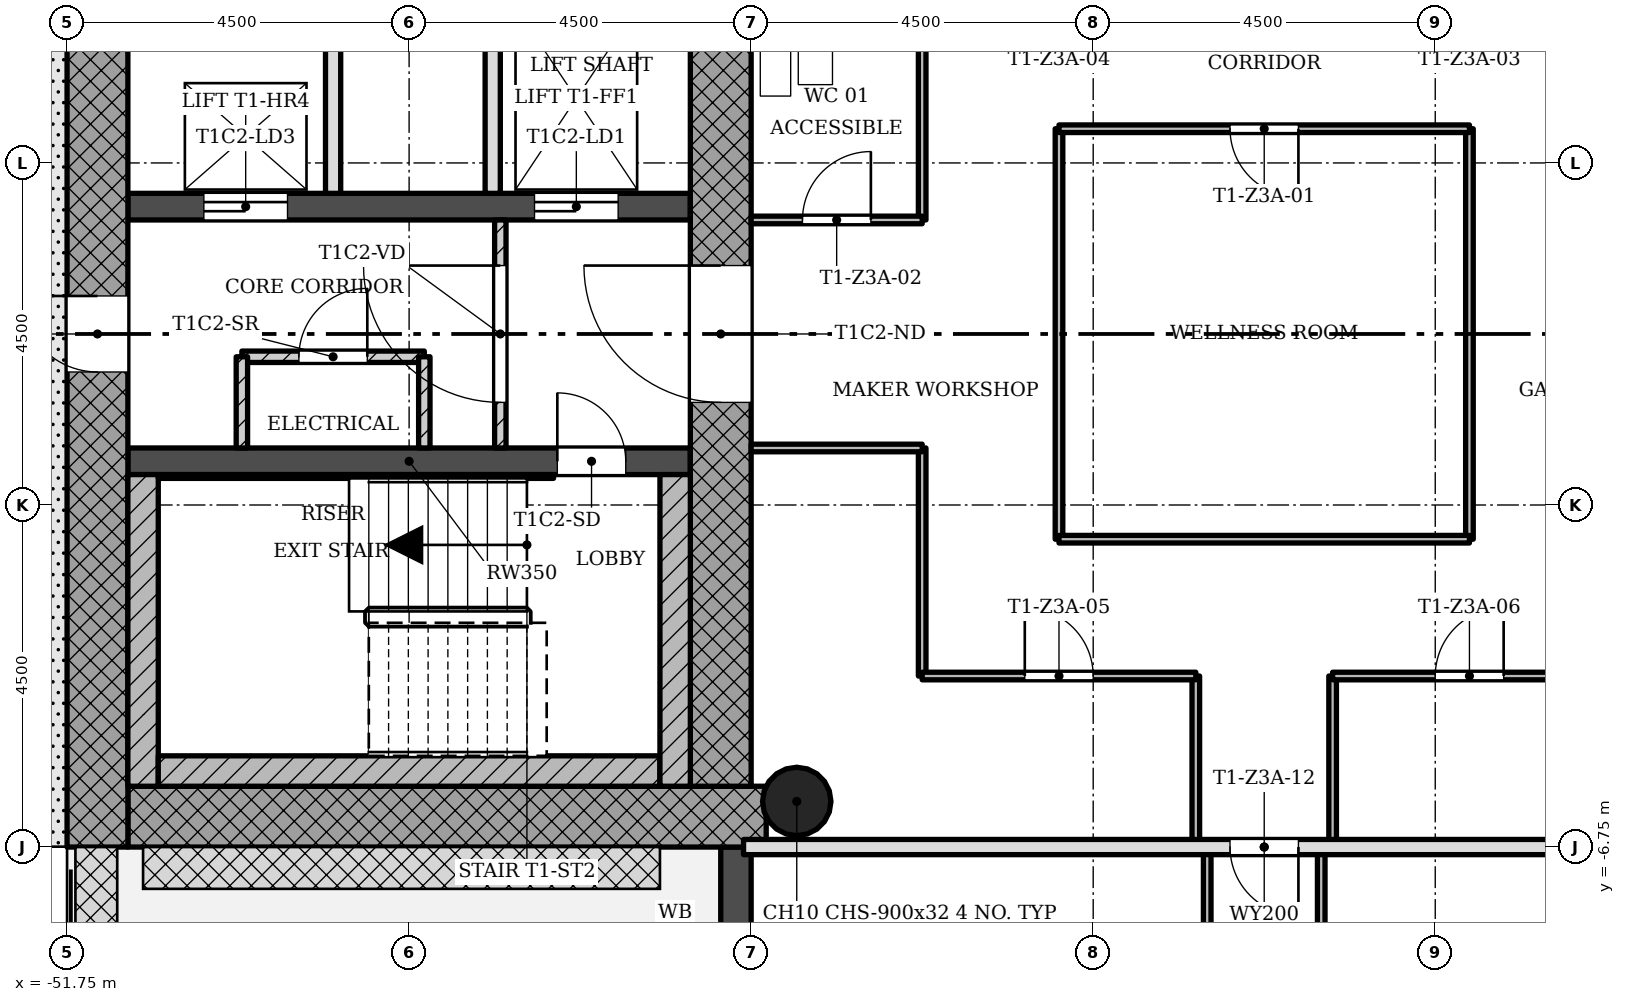
"""IFC4 building model, lengths in metres.
Left out: names, types, materials, properties, quantities, classifications, styles, units other than length and angle.
Written with IfcOpenShell. Run it as: python <this file> out.ifc"""

import sys

from ifc_helpers import new_model, si_unit, direction, frame, frame_2d, origin, origin_2d, place, context, subcontext, project, spatial, rectangle, hollow_circle, extrude, element, fill, save


model = new_model("IFC4")
c1 = context("Model", 3, precision=1e-05, world=origin(), true_north=direction((0.0, 1.0)))
c2 = subcontext(c1, "Body", "Model", "MODEL_VIEW")
j1 = project(units=[si_unit("LENGTHUNIT", "METRE"), si_unit("PLANEANGLEUNIT", "RADIAN")], contexts=[c1])
p1 = place(None, origin())
s1 = spatial("IfcSite", under=j1, at=p1, CompositionType="ELEMENT")
p2 = place(p1, origin())
s2 = spatial("IfcBuilding", under=s1, at=p2, CompositionType="ELEMENT")
p3 = place(p2, frame((0.0, 0.0, 133.7)))
s3 = spatial("IfcBuildingStorey", under=s2, at=p3, CompositionType="ELEMENT", Elevation=133.7)
p4 = place(p3, frame((-50.95, -6.35, 0.0), z_axis=(0.0, 0.0, 1.0), x_axis=(1.0, 0.0, 0.0)))
e1 = element("IfcWall", 1, at=p4, inside=s3, PredefinedType="SHEAR", context=c2, shape_type="SweptSolid", body=[
    extrude(rectangle(XDim=8.398, YDim=0.8, at=frame_2d((4.199, 0.0))), origin(), (0.0, 0.0, 1.0), 3.4),
])
p5 = place(p3, frame((-43.15, -5.95, 0.0), z_axis=(0.0, 0.0, 1.0), x_axis=(0.0, 1.0, 0.0)))
e2 = element("IfcWall", 2, at=p5, inside=s3, PredefinedType="SHEAR", context=c2, shape_type="SweptSolid", body=[
    extrude(rectangle(XDim=12.7, YDim=0.8, at=frame_2d((6.35, 0.0))), origin(), (0.0, 0.0, 1.0), 3.4),
])
p6 = place(p5, frame((5.05, 0.0, 0.0)))
e3 = element("IfcOpeningElement", 3, at=p6, cuts=e2, PredefinedType="OPENING", context=c2, shape_type="SweptSolid", body=[
    extrude(rectangle(XDim=1.8, YDim=2.1, at=frame_2d((0.9, 1.05))), frame((0.0, 0.41, 0.0), z_axis=(0.0, -1.0, 0.0), x_axis=(1.0, 0.0, 0.0)), (0.0, 0.0, 1.0), 0.82),
])
p7 = place(p3, frame((-51.35, 5.95, 0.0), z_axis=(0.0, 0.0, 1.0), x_axis=(0.0, -1.0, 0.0)))
e4 = element("IfcWall", 4, at=p7, inside=s3, PredefinedType="SHEAR", context=c2, shape_type="SweptSolid", body=[
    extrude(rectangle(XDim=12.7, YDim=0.8, at=frame_2d((6.35, 0.0))), origin(), (0.0, 0.0, 1.0), 3.4),
])
p8 = place(p7, frame((5.45, 0.0, 0.0)))
e5 = element("IfcOpeningElement", 5, at=p8, cuts=e4, PredefinedType="OPENING", context=c2, shape_type="SweptSolid", body=[
    extrude(rectangle(XDim=1.0, YDim=2.1, at=frame_2d((0.5, 1.05))), frame((0.0, 0.41, 0.0), z_axis=(0.0, -1.0, 0.0), x_axis=(1.0, 0.0, 0.0)), (0.0, 0.0, 1.0), 0.82),
])
p9 = place(p3, frame((-50.95, -1.675, 0.0), z_axis=(0.0, 0.0, 1.0), x_axis=(1.0, 0.0, 0.0)))
e6 = element("IfcWall", 6, at=p9, inside=s3, PredefinedType="SHEAR", context=c2, shape_type="SweptSolid", body=[
    extrude(rectangle(XDim=7.4, YDim=0.35, at=frame_2d((3.7, 0.0))), origin(), (0.0, 0.0, 1.0), 3.4),
])
p10 = place(p9, frame((5.65, 0.0, 0.0)))
e7 = element("IfcOpeningElement", 7, at=p10, cuts=e6, PredefinedType="OPENING", context=c2, shape_type="SweptSolid", body=[
    extrude(rectangle(XDim=0.9, YDim=2.1, at=frame_2d((0.45, 1.05))), frame((0.0, 0.185, 0.0), z_axis=(0.0, -1.0, 0.0), x_axis=(1.0, 0.0, 0.0)), (0.0, 0.0, 1.0), 0.37),
])
p11 = place(p3, frame((-50.95, 1.675, 0.0), z_axis=(0.0, 0.0, 1.0), x_axis=(1.0, 0.0, 0.0)))
e8 = element("IfcWall", 8, at=p11, inside=s3, PredefinedType="SHEAR", context=c2, shape_type="SweptSolid", body=[
    extrude(rectangle(XDim=7.4, YDim=0.35, at=frame_2d((3.7, 0.0))), origin(), (0.0, 0.0, 1.0), 3.4),
])
p12 = place(p11, frame((5.35, 0.0, 0.0)))
e9 = element("IfcOpeningElement", 9, at=p12, cuts=e8, PredefinedType="OPENING", context=c2, shape_type="SweptSolid", body=[
    extrude(rectangle(XDim=1.1, YDim=2.1, at=frame_2d((0.55, 1.05))), frame((0.0, 0.185, 0.0), z_axis=(0.0, -1.0, 0.0), x_axis=(1.0, 0.0, 0.0)), (0.0, 0.0, 1.0), 0.37),
])
p13 = place(p11, frame((1.0, 0.0, 0.0)))
e10 = element("IfcOpeningElement", 10, at=p13, cuts=e8, PredefinedType="OPENING", context=c2, shape_type="SweptSolid", body=[
    extrude(rectangle(XDim=1.1, YDim=2.1, at=frame_2d((0.55, 1.05))), frame((0.0, 0.185, 0.0), z_axis=(0.0, -1.0, 0.0), x_axis=(1.0, 0.0, 0.0)), (0.0, 0.0, 1.0), 0.37),
])
p14 = place(p3, frame((-42.15, -6.15, 0.0), z_axis=(0.0, 0.0, 1.0), x_axis=(1.0, 0.0, 0.0)))
e11 = element("IfcColumn", 11, at=p14, inside=s3, PredefinedType="COLUMN", context=c2, shape_type="SweptSolid", body=[
    extrude(hollow_circle(Radius=0.45, WallThickness=0.032, at=origin_2d()), origin(), (0.0, 0.0, 1.0), 3.4),
])
p15 = place(p3, frame((-42.95, -6.75, -0.02), z_axis=(0.0, 0.0, 1.0), x_axis=(0.0, -1.0, 0.0)))
e12 = element("IfcWall", 12, at=p15, inside=s3, PredefinedType="STANDARD", context=c2, shape_type="SweptSolid", body=[
    extrude(rectangle(XDim=4.5, YDim=0.4, at=frame_2d((2.25, 0.0))), origin(), (0.0, 0.0, 1.0), 3.12),
])
p16 = place(p15, frame((1.35, 0.0, 0.02)))
e13 = element("IfcOpeningElement", 13, at=p16, cuts=e12, PredefinedType="OPENING", context=c2, shape_type="SweptSolid", body=[
    extrude(rectangle(XDim=1.8, YDim=2.1, at=frame_2d((0.9, 1.05))), frame((0.0, 0.21, 0.0), z_axis=(0.0, -1.0, 0.0), x_axis=(1.0, 0.0, 0.0)), (0.0, 0.0, 1.0), 0.42),
])
p17 = place(p3, frame((-46.05, 1.5, 0.0), z_axis=(0.0, 0.0, 1.0), x_axis=(0.0, -1.0, 0.0)))
e14 = element("IfcWall", 14, at=p17, inside=s3, PredefinedType="PARTITIONING", context=c2, shape_type="SweptSolid", body=[
    extrude(rectangle(XDim=3.0, YDim=0.15, at=frame_2d((1.5, 0.0))), origin(), (0.0, 0.0, 1.0), 3.0),
])
p18 = place(p17, frame((0.6, 0.0, 0.0)))
e15 = element("IfcOpeningElement", 15, at=p18, cuts=e14, PredefinedType="OPENING", context=c2, shape_type="SweptSolid", body=[
    extrude(rectangle(XDim=1.8, YDim=2.1, at=frame_2d((0.9, 1.05))), frame((0.0, 0.085, 0.0), z_axis=(0.0, -1.0, 0.0), x_axis=(1.0, 0.0, 0.0)), (0.0, 0.0, 1.0), 0.17),
])
for number, where, z_axis, x_axis in (
    (16, (-46.15, 5.95, 0.0), (0.0, 0.0, 1.0), (0.0, -1.0, 0.0)),
    (17, (-48.25, 5.95, 0.0), (0.0, 0.0, 1.0), (0.0, -1.0, 0.0)),
):
    element("IfcWall", number, at=place(p3, frame(where, z_axis=z_axis, x_axis=x_axis)), inside=s3, PredefinedType="SOLIDWALL", context=c2, shape_type="SweptSolid", body=[
        extrude(rectangle(XDim=4.1, YDim=0.2, at=frame_2d((2.05, 0.0))), origin(), (0.0, 0.0, 1.0), 3.0),
    ])
p19 = place(p3, frame((-47.05, -0.3, 0.0), z_axis=(0.0, 0.0, 1.0), x_axis=(-1.0, 0.0, 0.0)))
e18 = element("IfcWall", 18, at=p19, inside=s3, PredefinedType="PARTITIONING", context=c2, shape_type="SweptSolid", body=[
    extrude(rectangle(XDim=2.4, YDim=0.15, at=frame_2d((1.2, 0.0))), origin(), (0.0, 0.0, 1.0), 3.0),
])
p20 = place(p19, frame((0.75, 0.0, 0.0)))
e19 = element("IfcOpeningElement", 19, at=p20, cuts=e18, PredefinedType="OPENING", context=c2, shape_type="SweptSolid", body=[
    extrude(rectangle(XDim=0.9, YDim=2.1, at=frame_2d((0.45, 1.05))), frame((0.0, 0.085, 0.0), z_axis=(0.0, -1.0, 0.0), x_axis=(1.0, 0.0, 0.0)), (0.0, 0.0, 1.0), 0.17),
])
for number, where, z_axis, x_axis in (
    (20, (-47.05, -0.3, 0.0), (0.0, 0.0, 1.0), (0.0, -1.0, 0.0)),
    (21, (-49.45, -0.3, 0.0), (0.0, 0.0, 1.0), (0.0, -1.0, 0.0)),
):
    element("IfcWall", number, at=place(p3, frame(where, z_axis=z_axis, x_axis=x_axis)), inside=s3, PredefinedType="PARTITIONING", context=c2, shape_type="SweptSolid", body=[
        extrude(rectangle(XDim=1.2, YDim=0.15, at=frame_2d((0.6, 0.0))), origin(), (0.0, 0.0, 1.0), 3.0),
    ])
for number, where, z_axis, x_axis in (
    (22, (-40.5, -4.5, 0.0), (0.0, 0.0, 1.0), (0.0, 1.0, 0.0)),
    (23, (-40.5, 1.5, 0.0), (0.0, 0.0, 1.0), (0.0, 1.0, 0.0)),
):
    element("IfcWall", number, at=place(p3, frame(where, z_axis=z_axis, x_axis=x_axis)), inside=s3, PredefinedType="PARTITIONING", context=c2, shape_type="SweptSolid", body=[
        extrude(rectangle(XDim=3.0, YDim=0.1, at=frame_2d((1.5, 0.0))), origin(), (0.0, 0.0, 1.0), 3.0),
    ])
p21 = place(p3, frame((-38.7, -2.7, 0.0), z_axis=(0.0, 0.0, 1.0), x_axis=(0.0, 1.0, 0.0)))
e24 = element("IfcWall", 24, at=p21, inside=s3, PredefinedType="PARTITIONING", context=c2, shape_type="SweptSolid", body=[
    extrude(rectangle(XDim=5.4, YDim=0.1, at=frame_2d((2.7, 0.0))), origin(), (0.0, 0.0, 1.0), 3.0),
])
p22 = place(p3, frame((-36.9, -6.75, 0.0), z_axis=(0.0, 0.0, 1.0), x_axis=(0.0, 1.0, 0.0)))
e25 = element("IfcWall", 25, at=p22, inside=s3, PredefinedType="PARTITIONING", context=c2, shape_type="SweptSolid", body=[
    extrude(rectangle(XDim=2.25, YDim=0.1, at=frame_2d((1.125, 0.0))), origin(), (0.0, 0.0, 1.0), 3.0),
])
p23 = place(p3, frame((-36.75, -11.25, 0.0), z_axis=(0.0, 0.0, 1.0), x_axis=(0.0, 1.0, 0.0)))
e26 = element("IfcWall", 26, at=p23, inside=s3, PredefinedType="PARTITIONING", context=c2, shape_type="SweptSolid", body=[
    extrude(rectangle(XDim=4.5, YDim=0.1, at=frame_2d((2.25, 0.0))), origin(), (0.0, 0.0, 1.0), 3.0),
])
p24 = place(p23, frame((1.8, 0.0, 0.0)))
e27 = element("IfcOpeningElement", 27, at=p24, cuts=e26, PredefinedType="OPENING", context=c2, shape_type="SweptSolid", body=[
    extrude(rectangle(XDim=0.9, YDim=2.1, at=frame_2d((0.45, 1.05))), frame((0.0, 0.06, 0.0), z_axis=(0.0, -1.0, 0.0), x_axis=(1.0, 0.0, 0.0)), (0.0, 0.0, 1.0), 0.12),
])
p25 = place(p3, frame((-35.25, -11.25, 0.0), z_axis=(0.0, 0.0, 1.0), x_axis=(0.0, 1.0, 0.0)))
e28 = element("IfcWall", 28, at=p25, inside=s3, PredefinedType="PARTITIONING", context=c2, shape_type="SweptSolid", body=[
    extrude(rectangle(XDim=4.5, YDim=0.1, at=frame_2d((2.25, 0.0))), origin(), (0.0, 0.0, 1.0), 3.0),
])
p26 = place(p25, frame((1.8, 0.0, 0.0)))
e29 = element("IfcOpeningElement", 29, at=p26, cuts=e28, PredefinedType="OPENING", context=c2, shape_type="SweptSolid", body=[
    extrude(rectangle(XDim=0.9, YDim=2.1, at=frame_2d((0.45, 1.05))), frame((0.0, 0.06, 0.0), z_axis=(0.0, -1.0, 0.0), x_axis=(1.0, 0.0, 0.0)), (0.0, 0.0, 1.0), 0.12),
])
p27 = place(p3, frame((-35.1, -6.75, 0.0), z_axis=(0.0, 0.0, 1.0), x_axis=(0.0, 1.0, 0.0)))
e30 = element("IfcWall", 30, at=p27, inside=s3, PredefinedType="PARTITIONING", context=c2, shape_type="SweptSolid", body=[
    extrude(rectangle(XDim=2.25, YDim=0.1, at=frame_2d((1.125, 0.0))), origin(), (0.0, 0.0, 1.0), 3.0),
])
p28 = place(p3, frame((-33.3, -2.7, 0.0), z_axis=(0.0, 0.0, 1.0), x_axis=(0.0, 1.0, 0.0)))
e31 = element("IfcWall", 31, at=p28, inside=s3, PredefinedType="PARTITIONING", context=c2, shape_type="SweptSolid", body=[
    extrude(rectangle(XDim=5.4, YDim=0.1, at=frame_2d((2.7, 0.0))), origin(), (0.0, 0.0, 1.0), 3.0),
])
p29 = place(p3, frame((-42.85, -6.75, 0.0), z_axis=(0.0, 0.0, 1.0), x_axis=(1.0, 0.0, 0.0)))
e32 = element("IfcWall", 32, at=p29, inside=s3, PredefinedType="SOLIDWALL", context=c2, shape_type="SweptSolid", body=[
    extrude(rectangle(XDim=13.7, YDim=0.2, at=frame_2d((6.85, 0.0))), origin(), (0.0, 0.0, 1.0), 3.0),
])
p30 = place(p29, frame((6.4, 0.0, 0.0)))
e33 = element("IfcOpeningElement", 33, at=p30, cuts=e32, PredefinedType="OPENING", context=c2, shape_type="SweptSolid", body=[
    extrude(rectangle(XDim=0.9, YDim=2.1, at=frame_2d((0.45, 1.05))), frame((0.0, 0.11, 0.0), z_axis=(0.0, -1.0, 0.0), x_axis=(1.0, 0.0, 0.0)), (0.0, 0.0, 1.0), 0.22),
])
p31 = place(p3, frame((-40.5, -4.5, 0.0), z_axis=(0.0, 0.0, 1.0), x_axis=(1.0, 0.0, 0.0)))
e34 = element("IfcWall", 34, at=p31, inside=s3, PredefinedType="PARTITIONING", context=c2, shape_type="SweptSolid", body=[
    extrude(rectangle(XDim=3.6, YDim=0.1, at=frame_2d((1.8, 0.0))), origin(), (0.0, 0.0, 1.0), 3.0),
])
p32 = place(p31, frame((1.35, 0.0, 0.0)))
e35 = element("IfcOpeningElement", 35, at=p32, cuts=e34, PredefinedType="OPENING", context=c2, shape_type="SweptSolid", body=[
    extrude(rectangle(XDim=0.9, YDim=2.1, at=frame_2d((0.45, 1.05))), frame((0.0, 0.06, 0.0), z_axis=(0.0, -1.0, 0.0), x_axis=(1.0, 0.0, 0.0)), (0.0, 0.0, 1.0), 0.12),
])
p33 = place(p3, frame((-35.1, -4.5, 0.0), z_axis=(0.0, 0.0, 1.0), x_axis=(1.0, 0.0, 0.0)))
e36 = element("IfcWall", 36, at=p33, inside=s3, PredefinedType="PARTITIONING", context=c2, shape_type="SweptSolid", body=[
    extrude(rectangle(XDim=3.6, YDim=0.1, at=frame_2d((1.8, 0.0))), origin(), (0.0, 0.0, 1.0), 3.0),
])
p34 = place(p33, frame((1.35, 0.0, 0.0)))
e37 = element("IfcOpeningElement", 37, at=p34, cuts=e36, PredefinedType="OPENING", context=c2, shape_type="SweptSolid", body=[
    extrude(rectangle(XDim=0.9, YDim=2.1, at=frame_2d((0.45, 1.05))), frame((0.0, 0.06, 0.0), z_axis=(0.0, -1.0, 0.0), x_axis=(1.0, 0.0, 0.0)), (0.0, 0.0, 1.0), 0.12),
])
p35 = place(p3, frame((-38.7, -2.7, 0.0), z_axis=(0.0, 0.0, 1.0), x_axis=(1.0, 0.0, 0.0)))
e38 = element("IfcWall", 38, at=p35, inside=s3, PredefinedType="PARTITIONING", context=c2, shape_type="SweptSolid", body=[
    extrude(rectangle(XDim=5.4, YDim=0.1, at=frame_2d((2.7, 0.0))), origin(), (0.0, 0.0, 1.0), 3.0),
])
p36 = place(p3, frame((-42.75, -1.5, 0.0), z_axis=(0.0, 0.0, 1.0), x_axis=(1.0, 0.0, 0.0)))
e39 = element("IfcWall", 39, at=p36, inside=s3, PredefinedType="PARTITIONING", context=c2, shape_type="SweptSolid", body=[
    extrude(rectangle(XDim=2.25, YDim=0.1, at=frame_2d((1.125, 0.0))), origin(), (0.0, 0.0, 1.0), 3.0),
])
p37 = place(p3, frame((-42.75, 1.5, 0.0), z_axis=(0.0, 0.0, 1.0), x_axis=(1.0, 0.0, 0.0)))
e40 = element("IfcWall", 40, at=p37, inside=s3, PredefinedType="PARTITIONING", context=c2, shape_type="SweptSolid", body=[
    extrude(rectangle(XDim=2.25, YDim=0.1, at=frame_2d((1.125, 0.0))), origin(), (0.0, 0.0, 1.0), 3.0),
])
p38 = place(p37, frame((0.675, 0.0, 0.0)))
e41 = element("IfcOpeningElement", 41, at=p38, cuts=e40, PredefinedType="OPENING", context=c2, shape_type="SweptSolid", body=[
    extrude(rectangle(XDim=0.9, YDim=2.1, at=frame_2d((0.45, 1.05))), frame((0.0, 0.06, 0.0), z_axis=(0.0, -1.0, 0.0), x_axis=(1.0, 0.0, 0.0)), (0.0, 0.0, 1.0), 0.12),
])
p39 = place(p3, frame((-38.7, 2.7, 0.0), z_axis=(0.0, 0.0, 1.0), x_axis=(1.0, 0.0, 0.0)))
e42 = element("IfcWall", 42, at=p39, inside=s3, PredefinedType="PARTITIONING", context=c2, shape_type="SweptSolid", body=[
    extrude(rectangle(XDim=5.4, YDim=0.1, at=frame_2d((2.7, 0.0))), origin(), (0.0, 0.0, 1.0), 3.0),
])
p40 = place(p39, frame((2.25, 0.0, 0.0)))
e43 = element("IfcOpeningElement", 43, at=p40, cuts=e42, PredefinedType="OPENING", context=c2, shape_type="SweptSolid", body=[
    extrude(rectangle(XDim=0.9, YDim=2.1, at=frame_2d((0.45, 1.05))), frame((0.0, 0.06, 0.0), z_axis=(0.0, -1.0, 0.0), x_axis=(1.0, 0.0, 0.0)), (0.0, 0.0, 1.0), 0.12),
])
p41 = place(p3, frame((-50.75, -1.85, 0.0), z_axis=(0.0, 0.0, 1.0), x_axis=(0.0, -1.0, 0.0)))
e44 = element("IfcWall", 44, at=p41, inside=s3, PredefinedType="SHEAR", context=c2, shape_type="SweptSolid", body=[
    extrude(rectangle(XDim=4.1, YDim=0.4, at=frame_2d((2.05, 0.0))), origin(), (0.0, 0.0, 1.0), 3.4),
])
p42 = place(p3, frame((-43.95, -5.75, 0.0), z_axis=(0.0, 0.0, 1.0), x_axis=(-1.0, 0.0, 0.0)))
e45 = element("IfcWall", 45, at=p42, inside=s3, PredefinedType="SHEAR", context=c2, shape_type="SweptSolid", body=[
    extrude(rectangle(XDim=6.6, YDim=0.4, at=frame_2d((3.3, 0.0))), origin(), (0.0, 0.0, 1.0), 3.4),
])
p43 = place(p3, frame((-43.75, -1.85, 0.0), z_axis=(0.0, 0.0, 1.0), x_axis=(0.0, -1.0, 0.0)))
e46 = element("IfcWall", 46, at=p43, inside=s3, PredefinedType="SHEAR", context=c2, shape_type="SweptSolid", body=[
    extrude(rectangle(XDim=4.1, YDim=0.4, at=frame_2d((2.05, 0.0))), origin(), (0.0, 0.0, 1.0), 3.4),
])
p44 = place(p3, frame((-45.35, -1.875, 0.0), z_axis=(0.0, 0.0, 1.0), x_axis=(-1.0, 0.0, 0.0)))
e47 = element("IfcWall", 47, at=p44, inside=s3, PredefinedType="SHEAR", context=c2, shape_type="SweptSolid", body=[
    extrude(rectangle(XDim=5.2, YDim=0.05, at=frame_2d((2.6, 0.0))), origin(), (0.0, 0.0, 1.0), 3.4),
])
p45 = place(p8, origin())
e48 = element("IfcDoor", 48, at=p45, inside=s3, OperationType="SINGLE_SWING_LEFT", PredefinedType="DOOR", context=c2, shape_type="SweptSolid", body=[
    extrude(rectangle(XDim=1.0, YDim=2.1, at=frame_2d((0.5, 1.05))), frame((0.0, 0.025, 0.0), z_axis=(0.0, -1.0, 0.0), x_axis=(1.0, 0.0, 0.0)), (0.0, 0.0, 1.0), 0.05),
])
fill(e5, e48)
p46 = place(p18, origin())
e49 = element("IfcDoor", 49, at=p46, inside=s3, OperationType="SINGLE_SWING_LEFT", PredefinedType="DOOR", context=c2, shape_type="SweptSolid", body=[
    extrude(rectangle(XDim=1.8, YDim=2.1, at=frame_2d((0.9, 1.05))), frame((0.0, 0.025, 0.0), z_axis=(0.0, -1.0, 0.0), x_axis=(1.0, 0.0, 0.0)), (0.0, 0.0, 1.0), 0.05),
])
fill(e15, e49)
p47 = place(p20, origin())
e50 = element("IfcDoor", 50, at=p47, inside=s3, OperationType="SINGLE_SWING_LEFT", PredefinedType="DOOR", context=c2, shape_type="SweptSolid", body=[
    extrude(rectangle(XDim=0.9, YDim=2.1, at=frame_2d((0.45, 1.05))), frame((0.0, 0.025, 0.0), z_axis=(0.0, -1.0, 0.0), x_axis=(1.0, 0.0, 0.0)), (0.0, 0.0, 1.0), 0.05),
])
fill(e19, e50)
p48 = place(p40, origin())
e51 = element("IfcDoor", 51, at=p48, inside=s3, OperationType="SINGLE_SWING_RIGHT", PredefinedType="DOOR", context=c2, shape_type="SweptSolid", body=[
    extrude(rectangle(XDim=0.9, YDim=2.1, at=frame_2d((0.45, 1.05))), frame((0.0, 0.025, 0.0), z_axis=(0.0, -1.0, 0.0), x_axis=(1.0, 0.0, 0.0)), (0.0, 0.0, 1.0), 0.05),
])
fill(e43, e51)
p49 = place(p38, origin())
e52 = element("IfcDoor", 52, at=p49, inside=s3, OperationType="SINGLE_SWING_LEFT", PredefinedType="DOOR", context=c2, shape_type="SweptSolid", body=[
    extrude(rectangle(XDim=0.9, YDim=2.1, at=frame_2d((0.45, 1.05))), frame((0.0, 0.025, 0.0), z_axis=(0.0, -1.0, 0.0), x_axis=(1.0, 0.0, 0.0)), (0.0, 0.0, 1.0), 0.05),
])
fill(e41, e52)
p50 = place(p32, origin())
e53 = element("IfcDoor", 53, at=p50, inside=s3, OperationType="SINGLE_SWING_RIGHT", PredefinedType="DOOR", context=c2, shape_type="SweptSolid", body=[
    extrude(rectangle(XDim=0.9, YDim=2.1, at=frame_2d((0.45, 1.05))), frame((0.0, 0.025, 0.0), z_axis=(0.0, -1.0, 0.0), x_axis=(1.0, 0.0, 0.0)), (0.0, 0.0, 1.0), 0.05),
])
fill(e35, e53)
p51 = place(p34, origin())
e54 = element("IfcDoor", 54, at=p51, inside=s3, OperationType="SINGLE_SWING_LEFT", PredefinedType="DOOR", context=c2, shape_type="SweptSolid", body=[
    extrude(rectangle(XDim=0.9, YDim=2.1, at=frame_2d((0.45, 1.05))), frame((0.0, 0.025, 0.0), z_axis=(0.0, -1.0, 0.0), x_axis=(1.0, 0.0, 0.0)), (0.0, 0.0, 1.0), 0.05),
])
fill(e37, e54)
p52 = place(p30, origin())
e55 = element("IfcDoor", 55, at=p52, inside=s3, OperationType="SINGLE_SWING_RIGHT", PredefinedType="DOOR", context=c2, shape_type="SweptSolid", body=[
    extrude(rectangle(XDim=0.9, YDim=2.1, at=frame_2d((0.45, 1.05))), frame((0.0, 0.025, 0.0), z_axis=(0.0, -1.0, 0.0), x_axis=(1.0, 0.0, 0.0)), (0.0, 0.0, 1.0), 0.05),
])
fill(e33, e55)
p53 = place(p10, origin())
e56 = element("IfcDoor", 56, at=p53, inside=s3, OperationType="SINGLE_SWING_RIGHT", PredefinedType="DOOR", context=c2, shape_type="SweptSolid", body=[
    extrude(rectangle(XDim=0.9, YDim=2.1, at=frame_2d((0.45, 1.05))), frame((0.0, 0.025, 0.0), z_axis=(0.0, -1.0, 0.0), x_axis=(1.0, 0.0, 0.0)), (0.0, 0.0, 1.0), 0.05),
])
fill(e7, e56)
p54 = place(p12, origin())
e57 = element("IfcDoor", 57, at=p54, inside=s3, OperationType="SLIDING_TO_LEFT", PredefinedType="DOOR", context=c2, shape_type="SweptSolid", body=[
    extrude(rectangle(XDim=1.1, YDim=2.1, at=frame_2d((0.55, 1.05))), frame((0.0, 0.025, 0.0), z_axis=(0.0, -1.0, 0.0), x_axis=(1.0, 0.0, 0.0)), (0.0, 0.0, 1.0), 0.05),
])
fill(e9, e57)
p55 = place(p13, origin())
e58 = element("IfcDoor", 58, at=p55, inside=s3, OperationType="SLIDING_TO_LEFT", PredefinedType="DOOR", context=c2, shape_type="SweptSolid", body=[
    extrude(rectangle(XDim=1.1, YDim=2.1, at=frame_2d((0.55, 1.05))), frame((0.0, 0.025, 0.0), z_axis=(0.0, -1.0, 0.0), x_axis=(1.0, 0.0, 0.0)), (0.0, 0.0, 1.0), 0.05),
])
fill(e10, e58)
p56 = place(p6, origin())
e59 = element("IfcDoor", 59, at=p56, inside=s3, OperationType="SINGLE_SWING_LEFT", PredefinedType="DOOR", context=c2, shape_type="SweptSolid", body=[
    extrude(rectangle(XDim=1.8, YDim=2.1, at=frame_2d((0.9, 1.05))), frame((0.0, 0.025, 0.0), z_axis=(0.0, -1.0, 0.0), x_axis=(1.0, 0.0, 0.0)), (0.0, 0.0, 1.0), 0.05),
])
fill(e3, e59)
save(model, sys.argv[1])
